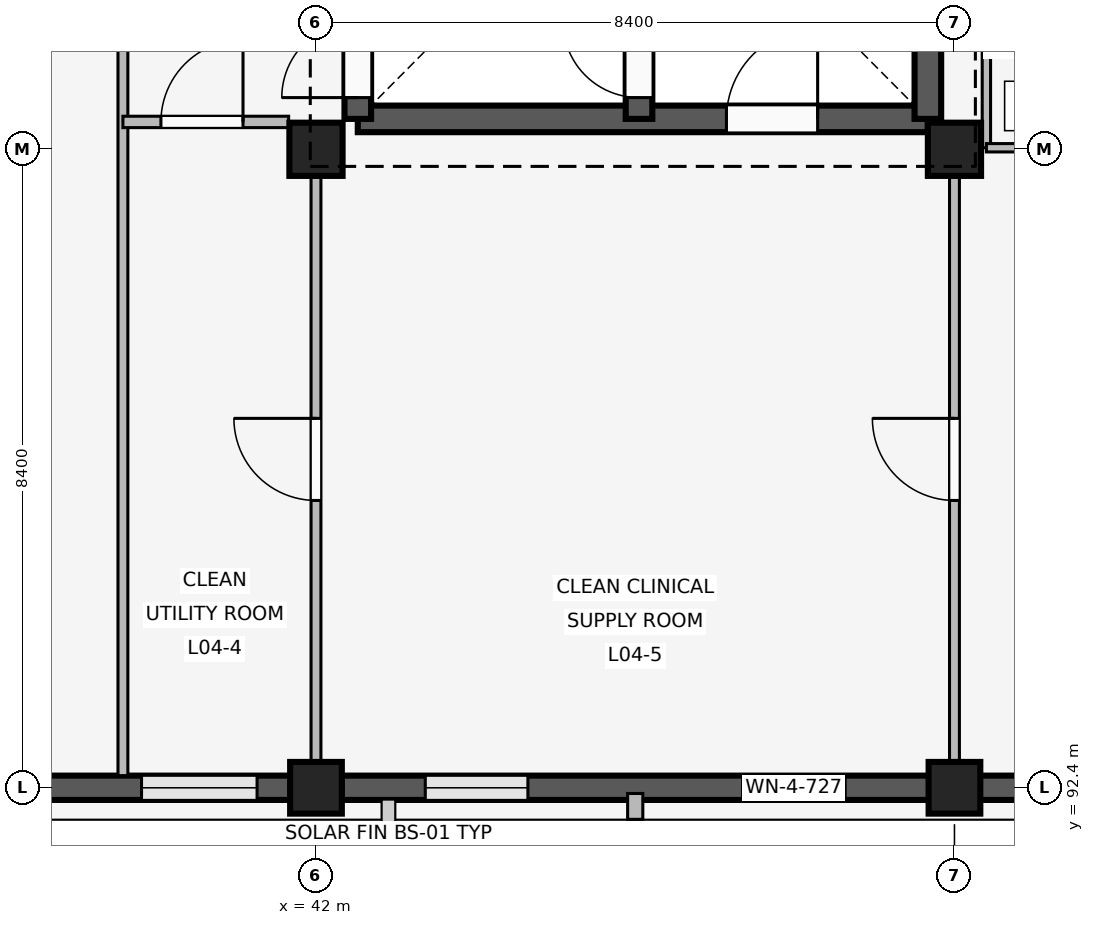
"""IFC4 building model, lengths in metres.
Left out: names, types, materials, properties, quantities, classifications, styles, units other than length and angle.
Written with IfcOpenShell. Run it as: python <this file> out.ifc"""

import sys

from ifc_helpers import new_model, si_unit, direction, frame, frame_2d, origin, origin_2d, place, context, subcontext, project, spatial, rectangle, extrude, element, fill, save


model = new_model("IFC4")
c1 = context("Model", 3, precision=1e-05, world=origin(), true_north=direction((0.0, 1.0)))
c2 = subcontext(c1, "Body", "Model", "MODEL_VIEW")
j1 = project(units=[si_unit("LENGTHUNIT", "METRE"), si_unit("PLANEANGLEUNIT", "RADIAN")], contexts=[c1])
p1 = place(None, origin())
s1 = spatial("IfcSite", under=j1, at=p1, CompositionType="ELEMENT")
p2 = place(p1, origin())
s2 = spatial("IfcBuilding", under=s1, at=p2, CompositionType="ELEMENT")
p3 = place(p2, frame((0.0, 0.0, 16.2)))
s3 = spatial("IfcBuildingStorey", under=s2, at=p3, CompositionType="ELEMENT", Elevation=16.2)
p4 = place(p3, frame((42.0, 92.4, 0.0), z_axis=(0.0, 0.0, 1.0), x_axis=(1.0, 0.0, 0.0)))
e1 = element("IfcColumn", 1, at=p4, inside=s3, PredefinedType="COLUMN", context=c2, shape_type="SweptSolid", body=[
    extrude(rectangle(XDim=0.68, YDim=0.68, at=origin_2d()), origin(), (0.0, 0.0, 1.0), 4.2),
])
p5 = place(p3, frame((42.0, 100.8, 0.0), z_axis=(0.0, 0.0, 1.0), x_axis=(1.0, 0.0, 0.0)))
e2 = element("IfcColumn", 2, at=p5, inside=s3, PredefinedType="COLUMN", context=c2, shape_type="SweptSolid", body=[
    extrude(rectangle(XDim=0.7, YDim=0.7, at=origin_2d()), origin(), (0.0, 0.0, 1.0), 4.2),
])
p6 = place(p3, frame((50.4, 92.4, 0.0), z_axis=(0.0, 0.0, 1.0), x_axis=(1.0, 0.0, 0.0)))
e3 = element("IfcColumn", 3, at=p6, inside=s3, PredefinedType="COLUMN", context=c2, shape_type="SweptSolid", body=[
    extrude(rectangle(XDim=0.68, YDim=0.68, at=origin_2d()), origin(), (0.0, 0.0, 1.0), 4.2),
])
p7 = place(p3, frame((50.4, 100.8, 0.0), z_axis=(0.0, 0.0, 1.0), x_axis=(1.0, 0.0, 0.0)))
e4 = element("IfcColumn", 4, at=p7, inside=s3, PredefinedType="COLUMN", context=c2, shape_type="SweptSolid", body=[
    extrude(rectangle(XDim=0.7, YDim=0.7, at=origin_2d()), origin(), (0.0, 0.0, 1.0), 4.2),
])
p8 = place(p3, frame((41.665, 92.4, 0.0), z_axis=(0.0, 0.0, 1.0), x_axis=(-1.0, 0.0, 0.0)))
e5 = element("IfcWall", 5, at=p8, inside=s3, PredefinedType="SOLIDWALL", context=c2, shape_type="SweptSolid", body=[
    extrude(rectangle(XDim=7.73, YDim=0.32, at=frame_2d((3.865, 0.0))), origin(), (0.0, 0.0, 1.0), 3.32),
])
p9 = place(p8, frame((0.44, 0.0, 0.85)))
e6 = element("IfcOpeningElement", 6, at=p9, cuts=e5, PredefinedType="OPENING", context=c2, shape_type="SweptSolid", body=[
    extrude(rectangle(XDim=1.52, YDim=1.65, at=frame_2d((0.76, 0.825))), frame((0.0, 0.17, 0.0), z_axis=(0.0, -1.0, 0.0), x_axis=(1.0, 0.0, 0.0)), (0.0, 0.0, 1.0), 0.34),
])
p10 = place(p8, frame((5.192, 0.0, 0.85)))
e7 = element("IfcOpeningElement", 7, at=p10, cuts=e5, PredefinedType="OPENING", context=c2, shape_type="SweptSolid", body=[
    extrude(rectangle(XDim=1.52, YDim=1.65, at=frame_2d((0.76, 0.825))), frame((0.0, 0.17, 0.0), z_axis=(0.0, -1.0, 0.0), x_axis=(1.0, 0.0, 0.0)), (0.0, 0.0, 1.0), 0.34),
])
p11 = place(p3, frame((50.065, 92.4, 0.0), z_axis=(0.0, 0.0, 1.0), x_axis=(-1.0, 0.0, 0.0)))
e8 = element("IfcWall", 8, at=p11, inside=s3, PredefinedType="SOLIDWALL", context=c2, shape_type="SweptSolid", body=[
    extrude(rectangle(XDim=7.73, YDim=0.32, at=frame_2d((3.865, 0.0))), origin(), (0.0, 0.0, 1.0), 3.32),
])
p12 = place(p11, frame((1.103, 0.0, 0.85)))
e9 = element("IfcOpeningElement", 9, at=p12, cuts=e8, PredefinedType="OPENING", context=c2, shape_type="SweptSolid", body=[
    extrude(rectangle(XDim=1.35, YDim=1.55, at=frame_2d((0.675, 0.775))), frame((0.0, 0.17, 0.0), z_axis=(0.0, -1.0, 0.0), x_axis=(1.0, 0.0, 0.0)), (0.0, 0.0, 1.0), 0.34),
])
p13 = place(p11, frame((5.277, 0.0, 0.85)))
e10 = element("IfcOpeningElement", 10, at=p13, cuts=e8, PredefinedType="OPENING", context=c2, shape_type="SweptSolid", body=[
    extrude(rectangle(XDim=1.35, YDim=1.55, at=frame_2d((0.675, 0.775))), frame((0.0, 0.17, 0.0), z_axis=(0.0, -1.0, 0.0), x_axis=(1.0, 0.0, 0.0)), (0.0, 0.0, 1.0), 0.34),
])
p14 = place(p3, frame((46.2, 92.325, 0.0), z_axis=(0.0, 0.0, 1.0), x_axis=(0.0, -1.0, 0.0)))
e11 = element("IfcWall", 11, at=p14, inside=s3, PredefinedType="ELEMENTEDWALL", context=c2, shape_type="SweptSolid", body=[
    extrude(rectangle(XDim=0.34, YDim=0.2, at=frame_2d((0.17, 0.0))), origin(), (0.0, 0.0, 1.0), 3.3),
])
p15 = place(p3, frame((58.465, 92.4, 0.0), z_axis=(0.0, 0.0, 1.0), x_axis=(-1.0, 0.0, 0.0)))
e12 = element("IfcWall", 12, at=p15, inside=s3, PredefinedType="SOLIDWALL", context=c2, shape_type="SweptSolid", body=[
    extrude(rectangle(XDim=7.73, YDim=0.32, at=frame_2d((3.865, 0.0))), origin(), (0.0, 0.0, 1.0), 3.32),
])
p16 = place(p15, frame((1.178, 0.0, 0.85)))
e13 = element("IfcOpeningElement", 13, at=p16, cuts=e12, PredefinedType="OPENING", context=c2, shape_type="SweptSolid", body=[
    extrude(rectangle(XDim=1.2, YDim=1.55, at=frame_2d((0.6, 0.775))), frame((0.0, 0.17, 0.0), z_axis=(0.0, -1.0, 0.0), x_axis=(1.0, 0.0, 0.0)), (0.0, 0.0, 1.0), 0.34),
])
p17 = place(p15, frame((5.352, 0.0, 0.85)))
e14 = element("IfcOpeningElement", 14, at=p17, cuts=e12, PredefinedType="OPENING", context=c2, shape_type="SweptSolid", body=[
    extrude(rectangle(XDim=1.2, YDim=1.55, at=frame_2d((0.6, 0.775))), frame((0.0, 0.17, 0.0), z_axis=(0.0, -1.0, 0.0), x_axis=(1.0, 0.0, 0.0)), (0.0, 0.0, 1.0), 0.34),
])
p18 = place(p3, frame((42.55, 101.2, 0.0), z_axis=(0.0, 0.0, 1.0), x_axis=(1.0, 0.0, 0.0)))
e15 = element("IfcWall", 15, at=p18, inside=s3, PredefinedType="SHEAR", context=c2, shape_type="SweptSolid", body=[
    extrude(rectangle(XDim=7.5, YDim=0.35, at=frame_2d((3.75, 0.0))), origin(), (0.0, 0.0, 1.0), 3.92),
])
p19 = place(p18, frame((4.85, 0.0, 0.0)))
e16 = element("IfcOpeningElement", 16, at=p19, cuts=e15, PredefinedType="OPENING", context=c2, shape_type="SweptSolid", body=[
    extrude(rectangle(XDim=1.2, YDim=2.2, at=frame_2d((0.6, 1.1))), frame((0.0, 0.185, 0.0), z_axis=(0.0, -1.0, 0.0), x_axis=(1.0, 0.0, 0.0)), (0.0, 0.0, 1.0), 0.37),
])
p20 = place(p3, frame((42.55, 101.2, 0.0), z_axis=(0.0, 0.0, 1.0), x_axis=(0.0, 1.0, 0.0)))
e17 = element("IfcWall", 17, at=p20, inside=s3, PredefinedType="SHEAR", context=c2, shape_type="SweptSolid", body=[
    extrude(rectangle(XDim=7.55, YDim=0.35, at=frame_2d((3.775, 0.0))), origin(), (0.0, 0.0, 1.0), 3.92),
])
p21 = place(p20, frame((0.28, 0.0, 0.0)))
e18 = element("IfcOpeningElement", 18, at=p21, cuts=e17, PredefinedType="OPENING", context=c2, shape_type="SweptSolid", body=[
    extrude(rectangle(XDim=1.0, YDim=2.15, at=frame_2d((0.5, 1.075))), frame((0.0, 0.185, 0.0), z_axis=(0.0, -1.0, 0.0), x_axis=(1.0, 0.0, 0.0)), (0.0, 0.0, 1.0), 0.37),
])
p22 = place(p3, frame((50.05, 101.2, 0.0), z_axis=(0.0, 0.0, 1.0), x_axis=(0.0, 1.0, 0.0)))
e19 = element("IfcWall", 19, at=p22, inside=s3, PredefinedType="SHEAR", context=c2, shape_type="SweptSolid", body=[
    extrude(rectangle(XDim=7.55, YDim=0.35, at=frame_2d((3.775, 0.0))), origin(), (0.0, 0.0, 1.0), 3.92),
])
p23 = place(p22, frame((2.4, 0.0, 0.0)))
e20 = element("IfcOpeningElement", 20, at=p23, cuts=e19, PredefinedType="OPENING", context=c2, shape_type="SweptSolid", body=[
    extrude(rectangle(XDim=1.2, YDim=2.2, at=frame_2d((0.6, 1.1))), frame((0.0, 0.185, 0.0), z_axis=(0.0, -1.0, 0.0), x_axis=(1.0, 0.0, 0.0)), (0.0, 0.0, 1.0), 0.37),
])
p24 = place(p3, frame((46.25, 101.2, 0.0), z_axis=(0.0, 0.0, 1.0), x_axis=(0.0, 1.0, 0.0)))
e21 = element("IfcWall", 21, at=p24, inside=s3, PredefinedType="SHEAR", context=c2, shape_type="SweptSolid", body=[
    extrude(rectangle(XDim=7.55, YDim=0.35, at=frame_2d((3.775, 0.0))), origin(), (0.0, 0.0, 1.0), 3.92),
])
p25 = place(p24, frame((0.28, 0.0, 0.0)))
e22 = element("IfcOpeningElement", 22, at=p25, cuts=e21, PredefinedType="OPENING", context=c2, shape_type="SweptSolid", body=[
    extrude(rectangle(XDim=1.0, YDim=2.15, at=frame_2d((0.5, 1.075))), frame((0.0, 0.185, 0.0), z_axis=(0.0, -1.0, 0.0), x_axis=(1.0, 0.0, 0.0)), (0.0, 0.0, 1.0), 0.37),
])
p26 = place(p3, frame((39.46, 92.56, 0.0), z_axis=(0.0, 0.0, 1.0), x_axis=(0.0, 1.0, 0.0)))
e23 = element("IfcWall", 23, at=p26, inside=s3, PredefinedType="PARTITIONING", context=c2, shape_type="SweptSolid", body=[
    extrude(rectangle(XDim=10.94, YDim=0.13, at=frame_2d((5.47, 0.0))), origin(), (0.0, 0.0, 1.0), 3.3),
])
p27 = place(p3, frame((39.46, 101.16, 0.0), z_axis=(0.0, 0.0, 1.0), x_axis=(1.0, 0.0, 0.0)))
e24 = element("IfcWall", 24, at=p27, inside=s3, PredefinedType="PARTITIONING", context=c2, shape_type="SweptSolid", body=[
    extrude(rectangle(XDim=2.18, YDim=0.15, at=frame_2d((1.09, 0.0))), origin(), (0.0, 0.0, 1.0), 3.3),
])
p28 = place(p27, frame((0.5, 0.0, 0.0)))
e25 = element("IfcOpeningElement", 25, at=p28, cuts=e24, PredefinedType="OPENING", context=c2, shape_type="SweptSolid", body=[
    extrude(rectangle(XDim=1.08, YDim=2.15, at=frame_2d((0.54, 1.075))), frame((0.0, 0.085, 0.0), z_axis=(0.0, -1.0, 0.0), x_axis=(1.0, 0.0, 0.0)), (0.0, 0.0, 1.0), 0.17),
])
p29 = place(p3, frame((42.0, 92.54, 0.0), z_axis=(0.0, 0.0, 1.0), x_axis=(0.0, 1.0, 0.0)))
e26 = element("IfcWall", 26, at=p29, inside=s3, PredefinedType="PARTITIONING", context=c2, shape_type="SweptSolid", body=[
    extrude(rectangle(XDim=8.21, YDim=0.13, at=frame_2d((4.105, 0.0))), origin(), (0.0, 0.0, 1.0), 3.3),
])
p30 = place(p29, frame((3.64, 0.0, 0.0)))
e27 = element("IfcOpeningElement", 27, at=p30, cuts=e26, PredefinedType="OPENING", context=c2, shape_type="SweptSolid", body=[
    extrude(rectangle(XDim=1.08, YDim=2.15, at=frame_2d((0.54, 1.075))), frame((0.0, 0.075, 0.0), z_axis=(0.0, -1.0, 0.0), x_axis=(1.0, 0.0, 0.0)), (0.0, 0.0, 1.0), 0.15),
])
p31 = place(p3, frame((50.4, 92.54, 0.0), z_axis=(0.0, 0.0, 1.0), x_axis=(0.0, 1.0, 0.0)))
e28 = element("IfcWall", 28, at=p31, inside=s3, PredefinedType="PARTITIONING", context=c2, shape_type="SweptSolid", body=[
    extrude(rectangle(XDim=8.21, YDim=0.13, at=frame_2d((4.105, 0.0))), origin(), (0.0, 0.0, 1.0), 3.3),
])
p32 = place(p31, frame((3.64, 0.0, 0.0)))
e29 = element("IfcOpeningElement", 29, at=p32, cuts=e28, PredefinedType="OPENING", context=c2, shape_type="SweptSolid", body=[
    extrude(rectangle(XDim=1.08, YDim=2.15, at=frame_2d((0.54, 1.075))), frame((0.0, 0.075, 0.0), z_axis=(0.0, -1.0, 0.0), x_axis=(1.0, 0.0, 0.0)), (0.0, 0.0, 1.0), 0.15),
])
p33 = place(p3, frame((50.82, 100.82, 0.0), z_axis=(0.0, 0.0, 1.0), x_axis=(0.0, 1.0, 0.0)))
e30 = element("IfcWall", 30, at=p33, inside=s3, PredefinedType="PARTITIONING", context=c2, shape_type="SweptSolid", body=[
    extrude(rectangle(XDim=2.61, YDim=0.11, at=frame_2d((1.305, 0.0))), origin(), (0.0, 0.0, 1.0), 3.3),
])
p34 = place(p3, frame((50.82, 100.82, 0.0), z_axis=(0.0, 0.0, 1.0), x_axis=(1.0, 0.0, 0.0)))
e31 = element("IfcWall", 31, at=p34, inside=s3, PredefinedType="PARTITIONING", context=c2, shape_type="SweptSolid", body=[
    extrude(rectangle(XDim=1.98, YDim=0.11, at=frame_2d((0.99, 0.0))), origin(), (0.0, 0.0, 1.0), 3.3),
])
p35 = place(p34, frame((0.54, 0.0, 0.0)))
e32 = element("IfcOpeningElement", 32, at=p35, cuts=e31, PredefinedType="OPENING", context=c2, shape_type="SweptSolid", body=[
    extrude(rectangle(XDim=0.9, YDim=2.1, at=frame_2d((0.45, 1.05))), frame((0.0, 0.065, 0.0), z_axis=(0.0, -1.0, 0.0), x_axis=(1.0, 0.0, 0.0)), (0.0, 0.0, 1.0), 0.13),
])
p36 = place(p9, origin())
e33 = element("IfcWindow", 33, at=p36, inside=s3, PartitioningType="SINGLE_PANEL", PredefinedType="WINDOW", context=c2, shape_type="SweptSolid", body=[
    extrude(rectangle(XDim=1.52, YDim=1.65, at=frame_2d((0.76, 0.825))), frame((0.0, 0.03, 0.0), z_axis=(0.0, -1.0, 0.0), x_axis=(1.0, 0.0, 0.0)), (0.0, 0.0, 1.0), 0.06),
])
fill(e6, e33)
p37 = place(p12, origin())
e34 = element("IfcWindow", 34, at=p37, inside=s3, PartitioningType="SINGLE_PANEL", PredefinedType="WINDOW", context=c2, shape_type="SweptSolid", body=[
    extrude(rectangle(XDim=1.35, YDim=1.55, at=frame_2d((0.675, 0.775))), frame((0.0, 0.03, 0.0), z_axis=(0.0, -1.0, 0.0), x_axis=(1.0, 0.0, 0.0)), (0.0, 0.0, 1.0), 0.06),
])
fill(e9, e34)
p38 = place(p13, origin())
e35 = element("IfcWindow", 35, at=p38, inside=s3, PartitioningType="SINGLE_PANEL", PredefinedType="WINDOW", context=c2, shape_type="SweptSolid", body=[
    extrude(rectangle(XDim=1.35, YDim=1.55, at=frame_2d((0.675, 0.775))), frame((0.0, 0.03, 0.0), z_axis=(0.0, -1.0, 0.0), x_axis=(1.0, 0.0, 0.0)), (0.0, 0.0, 1.0), 0.06),
])
fill(e10, e35)
p39 = place(p19, origin())
e36 = element("IfcDoor", 36, at=p39, inside=s3, OperationType="SINGLE_SWING_RIGHT", PredefinedType="DOOR", context=c2, shape_type="SweptSolid", body=[
    extrude(rectangle(XDim=1.2, YDim=2.2, at=frame_2d((0.6, 1.1))), frame((0.0, 0.025, 0.0), z_axis=(0.0, -1.0, 0.0), x_axis=(1.0, 0.0, 0.0)), (0.0, 0.0, 1.0), 0.05),
])
fill(e16, e36)
p40 = place(p21, origin())
e37 = element("IfcDoor", 37, at=p40, inside=s3, OperationType="SINGLE_SWING_LEFT", PredefinedType="DOOR", context=c2, shape_type="SweptSolid", body=[
    extrude(rectangle(XDim=1.0, YDim=2.15, at=frame_2d((0.5, 1.075))), frame((0.0, 0.025, 0.0), z_axis=(0.0, -1.0, 0.0), x_axis=(1.0, 0.0, 0.0)), (0.0, 0.0, 1.0), 0.05),
])
fill(e18, e37)
p41 = place(p25, origin())
e38 = element("IfcDoor", 38, at=p41, inside=s3, OperationType="SINGLE_SWING_RIGHT", PredefinedType="DOOR", context=c2, shape_type="SweptSolid", body=[
    extrude(rectangle(XDim=1.0, YDim=2.15, at=frame_2d((0.5, 1.075))), frame((0.0, 0.025, 0.0), z_axis=(0.0, -1.0, 0.0), x_axis=(1.0, 0.0, 0.0)), (0.0, 0.0, 1.0), 0.05),
])
fill(e22, e38)
p42 = place(p28, origin())
e39 = element("IfcDoor", 39, at=p42, inside=s3, OperationType="SINGLE_SWING_RIGHT", PredefinedType="DOOR", context=c2, shape_type="SweptSolid", body=[
    extrude(rectangle(XDim=1.08, YDim=2.15, at=frame_2d((0.54, 1.075))), frame((0.0, 0.025, 0.0), z_axis=(0.0, -1.0, 0.0), x_axis=(1.0, 0.0, 0.0)), (0.0, 0.0, 1.0), 0.05),
])
fill(e25, e39)
p43 = place(p30, origin())
e40 = element("IfcDoor", 40, at=p43, inside=s3, OperationType="SINGLE_SWING_RIGHT", PredefinedType="DOOR", context=c2, shape_type="SweptSolid", body=[
    extrude(rectangle(XDim=1.08, YDim=2.15, at=frame_2d((0.54, 1.075))), frame((0.0, 0.025, 0.0), z_axis=(0.0, -1.0, 0.0), x_axis=(1.0, 0.0, 0.0)), (0.0, 0.0, 1.0), 0.05),
])
fill(e27, e40)
p44 = place(p32, origin())
e41 = element("IfcDoor", 41, at=p44, inside=s3, OperationType="SINGLE_SWING_RIGHT", PredefinedType="DOOR", context=c2, shape_type="SweptSolid", body=[
    extrude(rectangle(XDim=1.08, YDim=2.15, at=frame_2d((0.54, 1.075))), frame((0.0, 0.025, 0.0), z_axis=(0.0, -1.0, 0.0), x_axis=(1.0, 0.0, 0.0)), (0.0, 0.0, 1.0), 0.05),
])
fill(e29, e41)
save(model, sys.argv[1])
